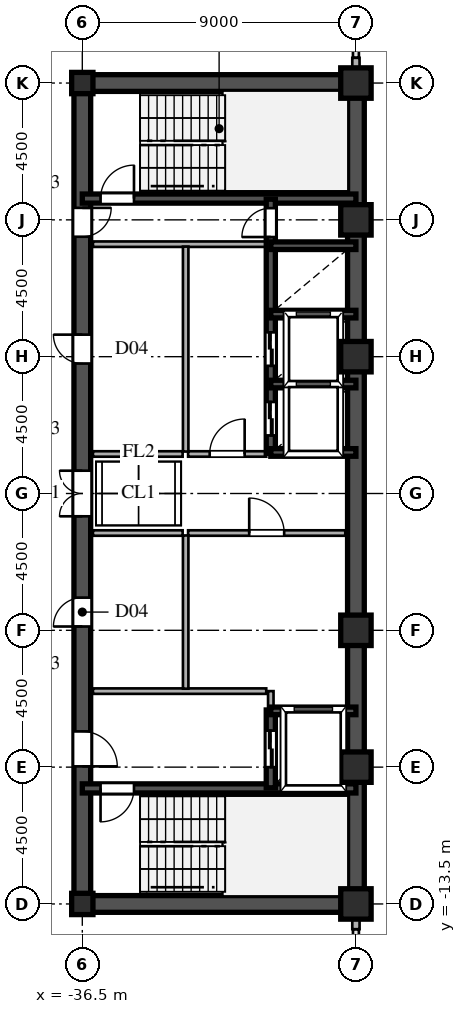
"""IFC4 building model, lengths in metres.
Left out: names, types, materials, properties, quantities, classifications, styles, units other than length and angle.
Written with IfcOpenShell. Run it as: python <this file> out.ifc"""

import sys

from ifc_helpers import new_model, si_unit, direction, frame, frame_2d, origin, origin_2d, place, context, subcontext, project, spatial, rectangle, hollow_rectangle, i_section, extrude, source, transform, mapped, element, fill, save


model = new_model("IFC4")
c1 = context("Model", 3, precision=1e-05, world=origin(), true_north=direction((0.0, 1.0)))
c2 = subcontext(c1, "Body", "Model", "MODEL_VIEW")
j1 = project(units=[si_unit("LENGTHUNIT", "METRE"), si_unit("PLANEANGLEUNIT", "RADIAN")], contexts=[c1])
p1 = place(None, origin())
s1 = spatial("IfcSite", under=j1, at=p1, CompositionType="ELEMENT")
p2 = place(p1, origin())
s2 = spatial("IfcBuilding", under=s1, at=p2, CompositionType="ELEMENT")
p3 = place(p2, frame((0.0, 0.0, 154.8)))
s3 = spatial("IfcBuildingStorey", under=s2, at=p3, CompositionType="ELEMENT", Elevation=154.8)
m1 = source(origin(), c2, "Body", "SweptSolid", [
    extrude(hollow_rectangle(XDim=1.0, YDim=1.0, WallThickness=0.042, at=origin_2d()), origin(), (0.0, 0.0, 1.0), 3.6),
])
for number, where, z_axis, x_axis in (
    (1, (-27.5, -13.5, 0.0), (0.0, 0.0, 1.0), (1.0, 0.0, 0.0)),
    (2, (-27.5, -9.0, 0.0), (0.0, 0.0, 1.0), (1.0, 0.0, 0.0)),
    (3, (-27.5, -4.5, 0.0), (0.0, 0.0, 1.0), (1.0, 0.0, 0.0)),
    (4, (-27.5, 4.5, 0.0), (0.0, 0.0, 1.0), (1.0, 0.0, 0.0)),
    (5, (-27.5, 9.0, 0.0), (0.0, 0.0, 1.0), (1.0, 0.0, 0.0)),
    (6, (-27.5, 13.5, 0.0), (0.0, 0.0, 1.0), (1.0, 0.0, 0.0)),
):
    element("IfcColumn", number, at=place(p3, frame(where, z_axis=z_axis, x_axis=x_axis)), inside=s3, PredefinedType="COLUMN", context=c2, shape_type="MappedRepresentation", body=[
        mapped(m1, transform((0.0, 0.0, 0.0), scale=1.0)),
    ])
m2 = source(origin(), c2, "Body", "SweptSolid", [
    extrude(i_section(OverallWidth=0.7, OverallDepth=0.7, WebThickness=0.028, FlangeThickness=0.045, at=origin_2d()), origin(), (0.0, 0.0, 1.0), 3.6),
])
for number, where, z_axis, x_axis in (
    (7, (-36.5, -13.5, 0.0), (0.0, 0.0, 1.0), (1.0, 0.0, 0.0)),
    (8, (-36.5, 13.5, 0.0), (0.0, 0.0, 1.0), (1.0, 0.0, 0.0)),
):
    element("IfcColumn", number, at=place(p3, frame(where, z_axis=z_axis, x_axis=x_axis)), inside=s3, PredefinedType="COLUMN", context=c2, shape_type="MappedRepresentation", body=[
        mapped(m2, transform((0.0, 0.0, 0.0), scale=1.0)),
    ])
for number, where, z_axis, x_axis in (
    (9, (-27.5, -14.33, 0.0), (0.0, 0.0, 1.0), (0.0, 1.0, 0.0)),
    (10, (-27.5, 13.78, 0.0), (0.0, 0.0, 1.0), (0.0, 1.0, 0.0)),
):
    element("IfcWall", number, at=place(p3, frame(where, z_axis=z_axis, x_axis=x_axis)), inside=s3, PredefinedType="SOLIDWALL", context=c2, shape_type="SweptSolid", body=[
        extrude(rectangle(XDim=0.55, YDim=0.24, at=frame_2d((0.275, 0.0))), origin(), (0.0, 0.0, 1.0), 1.88),
    ])
for number, where, z_axis, x_axis in (
    (11, (-27.5, -13.5, 0.0), (0.0, 0.0, 1.0), (0.0, 1.0, 0.0)),
    (12, (-27.5, 1.3, 0.0), (0.0, 0.0, 1.0), (0.0, 1.0, 0.0)),
):
    element("IfcWall", number, at=place(p3, frame(where, z_axis=z_axis, x_axis=x_axis)), inside=s3, PredefinedType="SHEAR", context=c2, shape_type="SweptSolid", body=[
        extrude(rectangle(XDim=12.2, YDim=0.55, at=frame_2d((6.1, 0.0))), origin(), (0.0, 0.0, 1.0), 3.38),
    ])
p4 = place(p3, frame((-27.5, -1.3, 0.0), z_axis=(0.0, 0.0, 1.0), x_axis=(0.0, 1.0, 0.0)))
e13 = element("IfcWall", 13, at=p4, inside=s3, PredefinedType="SHEAR", context=c2, shape_type="SweptSolid", body=[
    extrude(rectangle(XDim=2.6, YDim=0.55, at=frame_2d((1.3, 0.0))), origin(), (0.0, 0.0, 1.0), 3.38),
])
for number, where, z_axis, x_axis in (
    (14, (-36.5, -13.5, 0.0), (0.0, 0.0, 1.0), (1.0, 0.0, 0.0)),
    (15, (-36.5, 13.5, 0.0), (0.0, 0.0, 1.0), (1.0, 0.0, 0.0)),
):
    element("IfcWall", number, at=place(p3, frame(where, z_axis=z_axis, x_axis=x_axis)), inside=s3, PredefinedType="SHEAR", context=c2, shape_type="SweptSolid", body=[
        extrude(rectangle(XDim=9.0, YDim=0.55, at=frame_2d((4.5, 0.0))), origin(), (0.0, 0.0, 1.0), 3.38),
    ])
p5 = place(p3, frame((-36.5, -13.65, 0.0), z_axis=(0.0, 0.0, 1.0), x_axis=(0.0, 1.0, 0.0)))
e16 = element("IfcWall", 16, at=p5, inside=s3, PredefinedType="SHEAR", context=c2, shape_type="SweptSolid", body=[
    extrude(rectangle(XDim=7.15, YDim=0.55, at=frame_2d((3.575, 0.0))), origin(), (0.0, 0.0, 1.0), 3.38),
])
p6 = place(p5, frame((4.675, 0.0, 0.0)))
e17 = element("IfcOpeningElement", 17, at=p6, cuts=e16, PredefinedType="OPENING", context=c2, shape_type="SweptSolid", body=[
    extrude(rectangle(XDim=1.15, YDim=2.2, at=frame_2d((0.575, 1.1))), frame((0.0, 0.285, 0.0), z_axis=(0.0, -1.0, 0.0), x_axis=(1.0, 0.0, 0.0)), (0.0, 0.0, 1.0), 0.57),
])
p7 = place(p3, frame((-36.5, -1.3, 0.0), z_axis=(0.0, 0.0, 1.0), x_axis=(0.0, 1.0, 0.0)))
e18 = element("IfcWall", 18, at=p7, inside=s3, PredefinedType="SHEAR", context=c2, shape_type="SweptSolid", body=[
    extrude(rectangle(XDim=2.6, YDim=0.55, at=frame_2d((1.3, 0.0))), origin(), (0.0, 0.0, 1.0), 3.38),
])
p8 = place(p7, frame((0.55, 0.0, 0.0)))
e19 = element("IfcOpeningElement", 19, at=p8, cuts=e18, PredefinedType="OPENING", context=c2, shape_type="SweptSolid", body=[
    extrude(rectangle(XDim=1.5, YDim=2.3, at=frame_2d((0.75, 1.15))), frame((0.0, 0.285, 0.0), z_axis=(0.0, -1.0, 0.0), x_axis=(1.0, 0.0, 0.0)), (0.0, 0.0, 1.0), 0.57),
])
p9 = place(p3, frame((-36.5, 8.2, 0.0), z_axis=(0.0, 0.0, 1.0), x_axis=(0.0, 1.0, 0.0)))
e20 = element("IfcWall", 20, at=p9, inside=s3, PredefinedType="SHEAR", context=c2, shape_type="SweptSolid", body=[
    extrude(rectangle(XDim=5.45, YDim=0.55, at=frame_2d((2.725, 0.0))), origin(), (0.0, 0.0, 1.0), 3.38),
])
p10 = place(p9, frame((0.245, 0.0, 0.0)))
e21 = element("IfcOpeningElement", 21, at=p10, cuts=e20, PredefinedType="OPENING", context=c2, shape_type="SweptSolid", body=[
    extrude(rectangle(XDim=0.95, YDim=2.15, at=frame_2d((0.475, 1.075))), frame((0.0, 0.285, 0.0), z_axis=(0.0, -1.0, 0.0), x_axis=(1.0, 0.0, 0.0)), (0.0, 0.0, 1.0), 0.57),
])
p11 = place(p3, frame((-36.5, -6.5, 0.0), z_axis=(0.0, 0.0, 1.0), x_axis=(0.0, 1.0, 0.0)))
e22 = element("IfcWall", 22, at=p11, inside=s3, PredefinedType="SHEAR", context=c2, shape_type="SweptSolid", body=[
    extrude(rectangle(XDim=5.2, YDim=0.55, at=frame_2d((2.6, 0.0))), origin(), (0.0, 0.0, 1.0), 3.38),
])
p12 = place(p11, frame((2.125, 0.0, 0.0)))
e23 = element("IfcOpeningElement", 23, at=p12, cuts=e22, PredefinedType="OPENING", context=c2, shape_type="SweptSolid", body=[
    extrude(rectangle(XDim=0.95, YDim=2.15, at=frame_2d((0.475, 1.075))), frame((0.0, 0.285, 0.0), z_axis=(0.0, -1.0, 0.0), x_axis=(1.0, 0.0, 0.0)), (0.0, 0.0, 1.0), 0.57),
])
p13 = place(p3, frame((-36.5, 1.3, 0.0), z_axis=(0.0, 0.0, 1.0), x_axis=(0.0, 1.0, 0.0)))
e24 = element("IfcWall", 24, at=p13, inside=s3, PredefinedType="SHEAR", context=c2, shape_type="SweptSolid", body=[
    extrude(rectangle(XDim=6.9, YDim=0.55, at=frame_2d((3.45, 0.0))), origin(), (0.0, 0.0, 1.0), 3.38),
])
p14 = place(p13, frame((2.975, 0.0, 0.0)))
e25 = element("IfcOpeningElement", 25, at=p14, cuts=e24, PredefinedType="OPENING", context=c2, shape_type="SweptSolid", body=[
    extrude(rectangle(XDim=0.95, YDim=2.15, at=frame_2d((0.475, 1.075))), frame((0.0, 0.285, 0.0), z_axis=(0.0, -1.0, 0.0), x_axis=(1.0, 0.0, 0.0)), (0.0, 0.0, 1.0), 0.57),
])
p15 = place(p3, frame((-36.5, -9.7, 0.0), z_axis=(0.0, 0.0, 1.0), x_axis=(1.0, 0.0, 0.0)))
e26 = element("IfcWall", 26, at=p15, inside=s3, PredefinedType="SHEAR", context=c2, shape_type="SweptSolid", body=[
    extrude(rectangle(XDim=9.0, YDim=0.3, at=frame_2d((4.5, 0.0))), origin(), (0.0, 0.0, 1.0), 3.38),
])
p16 = place(p15, frame((0.6, 0.0, 0.0)))
e27 = element("IfcOpeningElement", 27, at=p16, cuts=e26, PredefinedType="OPENING", context=c2, shape_type="SweptSolid", body=[
    extrude(rectangle(XDim=1.1, YDim=2.2, at=frame_2d((0.55, 1.1))), frame((0.0, 0.16, 0.0), z_axis=(0.0, -1.0, 0.0), x_axis=(1.0, 0.0, 0.0)), (0.0, 0.0, 1.0), 0.32),
])
p17 = place(p3, frame((-36.5, 9.7, 0.0), z_axis=(0.0, 0.0, 1.0), x_axis=(1.0, 0.0, 0.0)))
e28 = element("IfcWall", 28, at=p17, inside=s3, PredefinedType="SHEAR", context=c2, shape_type="SweptSolid", body=[
    extrude(rectangle(XDim=9.0, YDim=0.3, at=frame_2d((4.5, 0.0))), origin(), (0.0, 0.0, 1.0), 3.38),
])
p18 = place(p17, frame((0.6, 0.0, 0.0)))
e29 = element("IfcOpeningElement", 29, at=p18, cuts=e28, PredefinedType="OPENING", context=c2, shape_type="SweptSolid", body=[
    extrude(rectangle(XDim=1.1, YDim=2.2, at=frame_2d((0.55, 1.1))), frame((0.0, 0.16, 0.0), z_axis=(0.0, -1.0, 0.0), x_axis=(1.0, 0.0, 0.0)), (0.0, 0.0, 1.0), 0.32),
])
for number, where, z_axis, x_axis in (
    (30, (-30.3, -7.15, 0.0), (0.0, 0.0, 1.0), (1.0, 0.0, 0.0)),
    (31, (-30.3, 1.35, 0.0), (0.0, 0.0, 1.0), (1.0, 0.0, 0.0)),
    (32, (-30.3, 3.6, 0.0), (0.0, 0.0, 1.0), (1.0, 0.0, 0.0)),
    (33, (-30.3, 5.9, 0.0), (0.0, 0.0, 1.0), (1.0, 0.0, 0.0)),
    (34, (-30.3, 8.15, 0.0), (0.0, 0.0, 1.0), (1.0, 0.0, 0.0)),
):
    element("IfcWall", number, at=place(p3, frame(where, z_axis=z_axis, x_axis=x_axis)), inside=s3, PredefinedType="SHEAR", context=c2, shape_type="SweptSolid", body=[
        extrude(rectangle(XDim=2.8, YDim=0.25, at=frame_2d((1.4, 0.0))), origin(), (0.0, 0.0, 1.0), 3.38),
    ])
p19 = place(p3, frame((-30.3, -9.68, 0.0), z_axis=(0.0, 0.0, 1.0), x_axis=(0.0, 1.0, 0.0)))
e35 = element("IfcWall", 35, at=p19, inside=s3, PredefinedType="SHEAR", context=c2, shape_type="SweptSolid", body=[
    extrude(rectangle(XDim=2.56, YDim=0.3, at=frame_2d((1.28, 0.0))), origin(), (0.0, 0.0, 1.0), 3.38),
])
p20 = place(p19, frame((0.68, 0.0, 0.0)))
e36 = element("IfcOpeningElement", 36, at=p20, cuts=e35, PredefinedType="OPENING", context=c2, shape_type="SweptSolid", body=[
    extrude(rectangle(XDim=1.2, YDim=2.25, at=frame_2d((0.6, 1.125))), frame((0.0, 0.16, 0.0), z_axis=(0.0, -1.0, 0.0), x_axis=(1.0, 0.0, 0.0)), (0.0, 0.0, 1.0), 0.32),
])
p21 = place(p3, frame((-30.3, 1.32, 0.0), z_axis=(0.0, 0.0, 1.0), x_axis=(0.0, 1.0, 0.0)))
e37 = element("IfcWall", 37, at=p21, inside=s3, PredefinedType="SHEAR", context=c2, shape_type="SweptSolid", body=[
    extrude(rectangle(XDim=2.28, YDim=0.3, at=frame_2d((1.14, 0.0))), origin(), (0.0, 0.0, 1.0), 3.38),
])
p22 = place(p21, frame((0.59, 0.0, 0.0)))
e38 = element("IfcOpeningElement", 38, at=p22, cuts=e37, PredefinedType="OPENING", context=c2, shape_type="SweptSolid", body=[
    extrude(rectangle(XDim=1.1, YDim=2.2, at=frame_2d((0.55, 1.1))), frame((0.0, 0.16, 0.0), z_axis=(0.0, -1.0, 0.0), x_axis=(1.0, 0.0, 0.0)), (0.0, 0.0, 1.0), 0.32),
])
p23 = place(p3, frame((-30.3, 3.6, 0.0), z_axis=(0.0, 0.0, 1.0), x_axis=(0.0, 1.0, 0.0)))
e39 = element("IfcWall", 39, at=p23, inside=s3, PredefinedType="SHEAR", context=c2, shape_type="SweptSolid", body=[
    extrude(rectangle(XDim=2.3, YDim=0.3, at=frame_2d((1.15, 0.0))), origin(), (0.0, 0.0, 1.0), 3.38),
])
p24 = place(p23, frame((0.6, 0.0, 0.0)))
e40 = element("IfcOpeningElement", 40, at=p24, cuts=e39, PredefinedType="OPENING", context=c2, shape_type="SweptSolid", body=[
    extrude(rectangle(XDim=1.1, YDim=2.2, at=frame_2d((0.55, 1.1))), frame((0.0, 0.16, 0.0), z_axis=(0.0, -1.0, 0.0), x_axis=(1.0, 0.0, 0.0)), (0.0, 0.0, 1.0), 0.32),
])
p25 = place(p3, frame((-30.3, 5.9, 0.0), z_axis=(0.0, 0.0, 1.0), x_axis=(0.0, 1.0, 0.0)))
e41 = element("IfcWall", 41, at=p25, inside=s3, PredefinedType="SHEAR", context=c2, shape_type="SweptSolid", body=[
    extrude(rectangle(XDim=2.25, YDim=0.3, at=frame_2d((1.125, 0.0))), origin(), (0.0, 0.0, 1.0), 3.38),
])
p26 = place(p3, frame((-30.3, 8.15, 0.0), z_axis=(0.0, 0.0, 1.0), x_axis=(0.0, 1.0, 0.0)))
e42 = element("IfcWall", 42, at=p26, inside=s3, PredefinedType="SHEAR", context=c2, shape_type="SweptSolid", body=[
    extrude(rectangle(XDim=1.53, YDim=0.3, at=frame_2d((0.765, 0.0))), origin(), (0.0, 0.0, 1.0), 3.38),
])
p27 = place(p26, frame((0.285, 0.0, 0.0)))
e43 = element("IfcOpeningElement", 43, at=p27, cuts=e42, PredefinedType="OPENING", context=c2, shape_type="SweptSolid", body=[
    extrude(rectangle(XDim=0.95, YDim=2.15, at=frame_2d((0.475, 1.075))), frame((0.0, 0.16, 0.0), z_axis=(0.0, -1.0, 0.0), x_axis=(1.0, 0.0, 0.0)), (0.0, 0.0, 1.0), 0.32),
])
p28 = place(p3, frame((-36.15, -6.5, 0.0), z_axis=(0.0, 0.0, 1.0), x_axis=(1.0, 0.0, 0.0)))
e44 = element("IfcWall", 44, at=p28, inside=s3, PredefinedType="PARTITIONING", context=c2, shape_type="SweptSolid", body=[
    extrude(rectangle(XDim=5.7, YDim=0.18, at=frame_2d((2.85, 0.0))), origin(), (0.0, 0.0, 1.0), 3.38),
])
p29 = place(p3, frame((-30.3, -7.12, 0.0), z_axis=(0.0, 0.0, 1.0), x_axis=(0.0, 1.0, 0.0)))
e45 = element("IfcWall", 45, at=p29, inside=s3, PredefinedType="PARTITIONING", context=c2, shape_type="SweptSolid", body=[
    extrude(rectangle(XDim=0.62, YDim=0.18, at=frame_2d((0.31, 0.0))), origin(), (0.0, 0.0, 1.0), 3.38),
])
p30 = place(p3, frame((-36.15, 8.2, 0.0), z_axis=(0.0, 0.0, 1.0), x_axis=(1.0, 0.0, 0.0)))
e46 = element("IfcWall", 46, at=p30, inside=s3, PredefinedType="PARTITIONING", context=c2, shape_type="SweptSolid", body=[
    extrude(rectangle(XDim=5.7, YDim=0.18, at=frame_2d((2.85, 0.0))), origin(), (0.0, 0.0, 1.0), 3.38),
])
p31 = place(p3, frame((-33.1, -6.42, 0.0), z_axis=(0.0, 0.0, 1.0), x_axis=(0.0, 1.0, 0.0)))
e47 = element("IfcWall", 47, at=p31, inside=s3, PredefinedType="PARTITIONING", context=c2, shape_type="SweptSolid", body=[
    extrude(rectangle(XDim=5.04, YDim=0.18, at=frame_2d((2.52, 0.0))), origin(), (0.0, 0.0, 1.0), 3.38),
])
p32 = place(p3, frame((-33.1, 1.38, 0.0), z_axis=(0.0, 0.0, 1.0), x_axis=(0.0, 1.0, 0.0)))
e48 = element("IfcWall", 48, at=p32, inside=s3, PredefinedType="PARTITIONING", context=c2, shape_type="SweptSolid", body=[
    extrude(rectangle(XDim=6.74, YDim=0.18, at=frame_2d((3.37, 0.0))), origin(), (0.0, 0.0, 1.0), 3.38),
])
p33 = place(p3, frame((-33.02, -1.3, 0.0), z_axis=(0.0, 0.0, 1.0), x_axis=(1.0, 0.0, 0.0)))
e49 = element("IfcWall", 49, at=p33, inside=s3, PredefinedType="PARTITIONING", context=c2, shape_type="SweptSolid", body=[
    extrude(rectangle(XDim=5.17, YDim=0.18, at=frame_2d((2.585, 0.0))), origin(), (0.0, 0.0, 1.0), 3.38),
])
p34 = place(p33, frame((2.01, 0.0, 0.0)))
e50 = element("IfcOpeningElement", 50, at=p34, cuts=e49, PredefinedType="OPENING", context=c2, shape_type="SweptSolid", body=[
    extrude(rectangle(XDim=1.15, YDim=2.2, at=frame_2d((0.575, 1.1))), frame((0.0, 0.1, 0.0), z_axis=(0.0, -1.0, 0.0), x_axis=(1.0, 0.0, 0.0)), (0.0, 0.0, 1.0), 0.2),
])
p35 = place(p3, frame((-33.02, 1.3, 0.0), z_axis=(0.0, 0.0, 1.0), x_axis=(1.0, 0.0, 0.0)))
e51 = element("IfcWall", 51, at=p35, inside=s3, PredefinedType="PARTITIONING", context=c2, shape_type="SweptSolid", body=[
    extrude(rectangle(XDim=2.57, YDim=0.18, at=frame_2d((1.285, 0.0))), origin(), (0.0, 0.0, 1.0), 3.38),
])
p36 = place(p35, frame((0.71, 0.0, 0.0)))
e52 = element("IfcOpeningElement", 52, at=p36, cuts=e51, PredefinedType="OPENING", context=c2, shape_type="SweptSolid", body=[
    extrude(rectangle(XDim=1.15, YDim=2.2, at=frame_2d((0.575, 1.1))), frame((0.0, 0.1, 0.0), z_axis=(0.0, -1.0, 0.0), x_axis=(1.0, 0.0, 0.0)), (0.0, 0.0, 1.0), 0.2),
])
for number, where, z_axis, x_axis in (
    (53, (-36.15, -1.3, 0.0), (0.0, 0.0, 1.0), (1.0, 0.0, 0.0)),
    (54, (-36.15, 1.3, 0.0), (0.0, 0.0, 1.0), (1.0, 0.0, 0.0)),
):
    element("IfcWall", number, at=place(p3, frame(where, z_axis=z_axis, x_axis=x_axis)), inside=s3, PredefinedType="PARTITIONING", context=c2, shape_type="SweptSolid", body=[
        extrude(rectangle(XDim=2.95, YDim=0.18, at=frame_2d((1.475, 0.0))), origin(), (0.0, 0.0, 1.0), 3.38),
    ])
m3 = source(origin(), c2, "Body", "SweptSolid", [
    extrude(rectangle(XDim=1.15, YDim=2.2, at=frame_2d((0.575, 1.1))), frame((0.0, 0.025, 0.0), z_axis=(0.0, -1.0, 0.0), x_axis=(1.0, 0.0, 0.0)), (0.0, 0.0, 1.0), 0.05),
])
p37 = place(p6, frame((1.15, 0.0, 0.0), z_axis=(0.0, 0.0, 1.0), x_axis=(-1.0, 0.0, 0.0)))
e55 = element("IfcDoor", 55, at=p37, inside=s3, OperationType="SINGLE_SWING_LEFT", PredefinedType="DOOR", context=c2, shape_type="MappedRepresentation", body=[
    mapped(m3, transform((0.0, 0.0, 0.0), scale=1.0)),
])
fill(e17, e55)
m4 = source(origin(), c2, "Body", "SweptSolid", [
    extrude(rectangle(XDim=1.5, YDim=2.3, at=frame_2d((0.75, 1.15))), frame((0.0, 0.025, 0.0), z_axis=(0.0, -1.0, 0.0), x_axis=(1.0, 0.0, 0.0)), (0.0, 0.0, 1.0), 0.05),
])
p38 = place(p8, origin())
e56 = element("IfcDoor", 56, at=p38, inside=s3, OperationType="DOUBLE_SWING_LEFT", PredefinedType="DOOR", context=c2, shape_type="MappedRepresentation", body=[
    mapped(m4, transform((0.0, 0.0, 0.0), scale=1.0)),
])
fill(e19, e56)
m5 = source(origin(), c2, "Body", "SweptSolid", [
    extrude(rectangle(XDim=0.95, YDim=2.15, at=frame_2d((0.475, 1.075))), frame((0.0, 0.025, 0.0), z_axis=(0.0, -1.0, 0.0), x_axis=(1.0, 0.0, 0.0)), (0.0, 0.0, 1.0), 0.05),
])
p39 = place(p10, frame((0.95, 0.0, 0.0), z_axis=(0.0, 0.0, 1.0), x_axis=(-1.0, 0.0, 0.0)))
e57 = element("IfcDoor", 57, at=p39, inside=s3, OperationType="SINGLE_SWING_RIGHT", PredefinedType="DOOR", context=c2, shape_type="MappedRepresentation", body=[
    mapped(m5, transform((0.0, 0.0, 0.0), scale=1.0)),
])
fill(e21, e57)
p40 = place(p12, origin())
e58 = element("IfcDoor", 58, at=p40, inside=s3, OperationType="SINGLE_SWING_LEFT", PredefinedType="DOOR", context=c2, shape_type="MappedRepresentation", body=[
    mapped(m5, transform((0.0, 0.0, 0.0), scale=1.0)),
])
fill(e23, e58)
p41 = place(p14, origin())
e59 = element("IfcDoor", 59, at=p41, inside=s3, OperationType="SINGLE_SWING_RIGHT", PredefinedType="DOOR", context=c2, shape_type="MappedRepresentation", body=[
    mapped(m5, transform((0.0, 0.0, 0.0), scale=1.0)),
])
fill(e25, e59)
m6 = source(origin(), c2, "Body", "SweptSolid", [
    extrude(rectangle(XDim=1.1, YDim=2.2, at=frame_2d((0.55, 1.1))), frame((0.0, 0.025, 0.0), z_axis=(0.0, -1.0, 0.0), x_axis=(1.0, 0.0, 0.0)), (0.0, 0.0, 1.0), 0.05),
])
p42 = place(p16, frame((1.1, 0.0, 0.0), z_axis=(0.0, 0.0, 1.0), x_axis=(-1.0, 0.0, 0.0)))
e60 = element("IfcDoor", 60, at=p42, inside=s3, OperationType="SINGLE_SWING_LEFT", PredefinedType="DOOR", context=c2, shape_type="MappedRepresentation", body=[
    mapped(m6, transform((0.0, 0.0, 0.0), scale=1.0)),
])
fill(e27, e60)
p43 = place(p18, origin())
e61 = element("IfcDoor", 61, at=p43, inside=s3, OperationType="SINGLE_SWING_RIGHT", PredefinedType="DOOR", context=c2, shape_type="MappedRepresentation", body=[
    mapped(m6, transform((0.0, 0.0, 0.0), scale=1.0)),
])
fill(e29, e61)
m7 = source(origin(), c2, "Body", "SweptSolid", [
    extrude(rectangle(XDim=1.2, YDim=2.25, at=frame_2d((0.6, 1.125))), frame((0.0, 0.025, 0.0), z_axis=(0.0, -1.0, 0.0), x_axis=(1.0, 0.0, 0.0)), (0.0, 0.0, 1.0), 0.05),
])
p44 = place(p20, origin())
e62 = element("IfcDoor", 62, at=p44, inside=s3, OperationType="DOUBLE_DOOR_SLIDING", PredefinedType="DOOR", context=c2, shape_type="MappedRepresentation", body=[
    mapped(m7, transform((0.0, 0.0, 0.0), scale=1.0)),
])
fill(e36, e62)
m8 = source(origin(), c2, "Body", "SweptSolid", [
    extrude(rectangle(XDim=1.1, YDim=2.2, at=frame_2d((0.55, 1.1))), frame((0.0, 0.025, 0.0), z_axis=(0.0, -1.0, 0.0), x_axis=(1.0, 0.0, 0.0)), (0.0, 0.0, 1.0), 0.05),
])
p45 = place(p22, origin())
e63 = element("IfcDoor", 63, at=p45, inside=s3, OperationType="DOUBLE_DOOR_SLIDING", PredefinedType="DOOR", context=c2, shape_type="MappedRepresentation", body=[
    mapped(m8, transform((0.0, 0.0, 0.0), scale=1.0)),
])
fill(e38, e63)
p46 = place(p24, origin())
e64 = element("IfcDoor", 64, at=p46, inside=s3, OperationType="DOUBLE_DOOR_SLIDING", PredefinedType="DOOR", context=c2, shape_type="MappedRepresentation", body=[
    mapped(m8, transform((0.0, 0.0, 0.0), scale=1.0)),
])
fill(e40, e64)
p47 = place(p27, origin())
e65 = element("IfcDoor", 65, at=p47, inside=s3, OperationType="SINGLE_SWING_LEFT", PredefinedType="DOOR", context=c2, shape_type="MappedRepresentation", body=[
    mapped(m5, transform((0.0, 0.0, 0.0), scale=1.0)),
])
fill(e43, e65)
p48 = place(p34, origin())
e66 = element("IfcDoor", 66, at=p48, inside=s3, OperationType="SINGLE_SWING_LEFT", PredefinedType="DOOR", context=c2, shape_type="MappedRepresentation", body=[
    mapped(m3, transform((0.0, 0.0, 0.0), scale=1.0)),
])
fill(e50, e66)
p49 = place(p36, origin())
e67 = element("IfcDoor", 67, at=p49, inside=s3, OperationType="SINGLE_SWING_RIGHT", PredefinedType="DOOR", context=c2, shape_type="MappedRepresentation", body=[
    mapped(m3, transform((0.0, 0.0, 0.0), scale=1.0)),
])
fill(e52, e67)
save(model, sys.argv[1])
